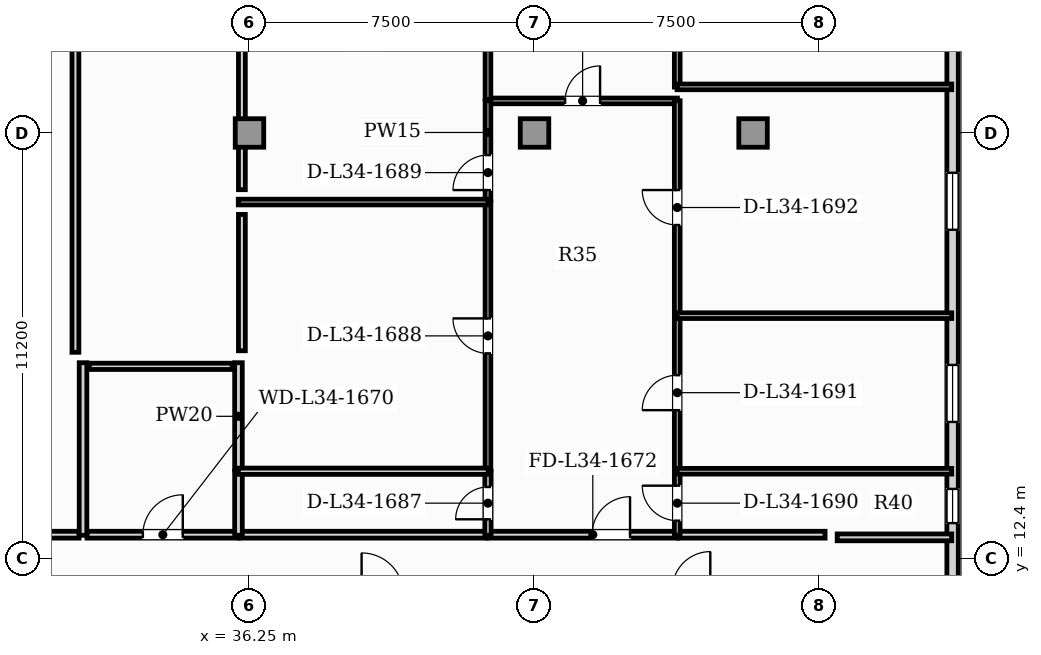
"""IFC4 building model, lengths in metres.
Left out: names, types, materials, properties, quantities, classifications, styles, units other than length and angle.
Written with IfcOpenShell. Run it as: python <this file> out.ifc"""

import sys

from ifc_helpers import new_model, si_unit, direction, frame, frame_2d, origin, origin_2d, place, context, subcontext, project, spatial, rectangle, extrude, element, fill, save


model = new_model("IFC4")
c1 = context("Model", 3, precision=1e-05, world=origin(), true_north=direction((0.0, 1.0)))
c2 = subcontext(c1, "Body", "Model", "MODEL_VIEW")
j1 = project(units=[si_unit("LENGTHUNIT", "METRE"), si_unit("PLANEANGLEUNIT", "RADIAN")], contexts=[c1])
p1 = place(None, origin())
s1 = spatial("IfcSite", under=j1, at=p1, CompositionType="ELEMENT")
p2 = place(p1, origin())
s2 = spatial("IfcBuilding", under=s1, at=p2, CompositionType="ELEMENT")
p3 = place(p2, frame((0.0, 0.0, 140.15)))
s3 = spatial("IfcBuildingStorey", under=s2, at=p3, CompositionType="ELEMENT", Elevation=140.15)
for number, where, z_axis, x_axis in (
    (1, (36.25, 23.6, 0.0), (0.0, 0.0, 1.0), (1.0, 0.0, 0.0)),
    (2, (43.75, 23.6, 0.0), (0.0, 0.0, 1.0), (1.0, 0.0, 0.0)),
    (3, (49.5, 23.6, 0.0), (0.0, 0.0, 1.0), (1.0, 0.0, 0.0)),
):
    element("IfcColumn", number, at=place(p3, frame(where, z_axis=z_axis, x_axis=x_axis)), inside=s3, PredefinedType="COLUMN", context=c2, shape_type="SweptSolid", body=[
        extrude(rectangle(XDim=0.75, YDim=0.75, at=origin_2d()), origin(), (0.0, 0.0, 1.0), 5.05),
    ])
p4 = place(p3, frame((54.75, 3.24, 0.0), z_axis=(0.0, 0.0, 1.0), x_axis=(0.0, 1.0, 0.0)))
e4 = element("IfcWall", 4, at=p4, inside=s3, PredefinedType="SOLIDWALL", context=c2, shape_type="SweptSolid", body=[
    extrude(rectangle(XDim=36.72, YDim=0.3, at=frame_2d((18.36, 0.0))), origin(), (0.0, 0.0, 1.0), 4.83),
])
p5 = place(p4, frame((30.56, 0.0, 0.95)))
e5 = element("IfcOpeningElement", 5, at=p5, cuts=e4, PredefinedType="OPENING", context=c2, shape_type="SweptSolid", body=[
    extrude(rectangle(XDim=0.9, YDim=1.5, at=frame_2d((0.45, 0.75))), frame((0.0, 0.16, 0.0), z_axis=(0.0, -1.0, 0.0), x_axis=(1.0, 0.0, 0.0)), (0.0, 0.0, 1.0), 0.32),
])
p6 = place(p4, frame((10.095, 0.0, 0.95)))
e6 = element("IfcOpeningElement", 6, at=p6, cuts=e4, PredefinedType="OPENING", context=c2, shape_type="SweptSolid", body=[
    extrude(rectangle(XDim=0.9, YDim=1.5, at=frame_2d((0.45, 0.75))), frame((0.0, 0.16, 0.0), z_axis=(0.0, -1.0, 0.0), x_axis=(1.0, 0.0, 0.0)), (0.0, 0.0, 1.0), 0.32),
])
p7 = place(p4, frame((12.757, 0.0, 0.9)))
e7 = element("IfcOpeningElement", 7, at=p7, cuts=e4, PredefinedType="OPENING", context=c2, shape_type="SweptSolid", body=[
    extrude(rectangle(XDim=1.5, YDim=1.95, at=frame_2d((0.75, 0.975))), frame((0.0, 0.16, 0.0), z_axis=(0.0, -1.0, 0.0), x_axis=(1.0, 0.0, 0.0)), (0.0, 0.0, 1.0), 0.32),
])
p8 = place(p4, frame((17.813, 0.0, 0.9)))
e8 = element("IfcOpeningElement", 8, at=p8, cuts=e4, PredefinedType="OPENING", context=c2, shape_type="SweptSolid", body=[
    extrude(rectangle(XDim=1.5, YDim=1.95, at=frame_2d((0.75, 0.975))), frame((0.0, 0.16, 0.0), z_axis=(0.0, -1.0, 0.0), x_axis=(1.0, 0.0, 0.0)), (0.0, 0.0, 1.0), 0.32),
])
p9 = place(p4, frame((25.167, 0.0, 0.9)))
e9 = element("IfcOpeningElement", 9, at=p9, cuts=e4, PredefinedType="OPENING", context=c2, shape_type="SweptSolid", body=[
    extrude(rectangle(XDim=1.5, YDim=1.95, at=frame_2d((0.75, 0.975))), frame((0.0, 0.16, 0.0), z_axis=(0.0, -1.0, 0.0), x_axis=(1.0, 0.0, 0.0)), (0.0, 0.0, 1.0), 0.32),
])
p10 = place(p4, frame((32.834, 0.0, 0.9)))
e10 = element("IfcOpeningElement", 10, at=p10, cuts=e4, PredefinedType="OPENING", context=c2, shape_type="SweptSolid", body=[
    extrude(rectangle(XDim=1.5, YDim=1.95, at=frame_2d((0.75, 0.975))), frame((0.0, 0.16, 0.0), z_axis=(0.0, -1.0, 0.0), x_axis=(1.0, 0.0, 0.0)), (0.0, 0.0, 1.0), 0.32),
])
p11 = place(p3, frame((21.535, 13.03, 0.0), z_axis=(0.0, 0.0, 1.0), x_axis=(1.0, 0.0, 0.0)))
e11 = element("IfcWall", 11, at=p11, inside=s3, PredefinedType="PARTITIONING", context=c2, shape_type="SweptSolid", body=[
    extrude(rectangle(XDim=10.23, YDim=0.18, at=frame_2d((5.115, 0.0))), origin(), (0.0, 0.0, 1.0), 4.83),
])
p12 = place(p11, frame((3.081, 0.0, 0.0)))
e12 = element("IfcOpeningElement", 12, at=p12, cuts=e11, PredefinedType="OPENING", context=c2, shape_type="SweptSolid", body=[
    extrude(rectangle(XDim=1.0, YDim=2.15, at=frame_2d((0.5, 1.075))), frame((0.0, 0.1, 0.0), z_axis=(0.0, -1.0, 0.0), x_axis=(1.0, 0.0, 0.0)), (0.0, 0.0, 1.0), 0.2),
])
p13 = place(p3, frame((31.975, 13.03, 0.0), z_axis=(0.0, 0.0, 1.0), x_axis=(1.0, 0.0, 0.0)))
e13 = element("IfcWall", 13, at=p13, inside=s3, PredefinedType="PARTITIONING", context=c2, shape_type="SweptSolid", body=[
    extrude(rectangle(XDim=3.99, YDim=0.18, at=frame_2d((1.995, 0.0))), origin(), (0.0, 0.0, 1.0), 4.83),
])
p14 = place(p13, frame((1.47, 0.0, 0.0)))
e14 = element("IfcOpeningElement", 14, at=p14, cuts=e13, PredefinedType="OPENING", context=c2, shape_type="SweptSolid", body=[
    extrude(rectangle(XDim=1.05, YDim=2.15, at=frame_2d((0.525, 1.075))), frame((0.0, 0.1, 0.0), z_axis=(0.0, -1.0, 0.0), x_axis=(1.0, 0.0, 0.0)), (0.0, 0.0, 1.0), 0.2),
])
p15 = place(p3, frame((42.52, 13.03, 0.0), z_axis=(0.0, 0.0, 1.0), x_axis=(1.0, 0.0, 0.0)))
e15 = element("IfcWall", 15, at=p15, inside=s3, PredefinedType="PARTITIONING", context=c2, shape_type="SweptSolid", body=[
    extrude(rectangle(XDim=4.99, YDim=0.18, at=frame_2d((2.495, 0.0))), origin(), (0.0, 0.0, 1.0), 4.83),
])
p16 = place(p15, frame((2.743, 0.0, 0.0)))
e16 = element("IfcOpeningElement", 16, at=p16, cuts=e15, PredefinedType="OPENING", context=c2, shape_type="SweptSolid", body=[
    extrude(rectangle(XDim=1.0, YDim=2.15, at=frame_2d((0.5, 1.075))), frame((0.0, 0.1, 0.0), z_axis=(0.0, -1.0, 0.0), x_axis=(1.0, 0.0, 0.0)), (0.0, 0.0, 1.0), 0.2),
])
p17 = place(p3, frame((35.995, 13.03, 0.0), z_axis=(0.0, 0.0, 1.0), x_axis=(1.0, 0.0, 0.0)))
e17 = element("IfcWall", 17, at=p17, inside=s3, PredefinedType="PARTITIONING", context=c2, shape_type="SweptSolid", body=[
    extrude(rectangle(XDim=6.495, YDim=0.18, at=frame_2d((3.248, 0.0))), origin(), (0.0, 0.0, 1.0), 4.83),
])
p18 = place(p3, frame((47.54, 13.03, 0.0), z_axis=(0.0, 0.0, 1.0), x_axis=(1.0, 0.0, 0.0)))
e18 = element("IfcWall", 18, at=p18, inside=s3, PredefinedType="PARTITIONING", context=c2, shape_type="SweptSolid", body=[
    extrude(rectangle(XDim=3.855, YDim=0.18, at=frame_2d((1.927, 0.0))), origin(), (0.0, 0.0, 1.0), 4.83),
])
p19 = place(p3, frame((31.87, 13.015, 0.0), z_axis=(0.0, 0.0, 1.0), x_axis=(0.0, 1.0, 0.0)))
e19 = element("IfcWall", 19, at=p19, inside=s3, PredefinedType="PARTITIONING", context=c2, shape_type="SweptSolid", body=[
    extrude(rectangle(XDim=4.54, YDim=0.2, at=frame_2d((2.27, 0.0))), origin(), (0.0, 0.0, 1.0), 4.83),
])
p20 = place(p3, frame((35.96, 13.015, 0.0), z_axis=(0.0, 0.0, 1.0), x_axis=(0.0, 1.0, 0.0)))
e20 = element("IfcWall", 20, at=p20, inside=s3, PredefinedType="PARTITIONING", context=c2, shape_type="SweptSolid", body=[
    extrude(rectangle(XDim=1.69, YDim=0.2, at=frame_2d((0.845, 0.0))), origin(), (0.0, 0.0, 1.0), 4.83),
])
p21 = place(p3, frame((35.96, 14.735, 0.0), z_axis=(0.0, 0.0, 1.0), x_axis=(0.0, 1.0, 0.0)))
e21 = element("IfcWall", 21, at=p21, inside=s3, PredefinedType="PARTITIONING", context=c2, shape_type="SweptSolid", body=[
    extrude(rectangle(XDim=2.82, YDim=0.2, at=frame_2d((1.41, 0.0))), origin(), (0.0, 0.0, 1.0), 4.83),
])
p22 = place(p3, frame((42.52, 24.444, 0.0), z_axis=(0.0, 0.0, 1.0), x_axis=(1.0, 0.0, 0.0)))
e22 = element("IfcWall", 22, at=p22, inside=s3, PredefinedType="PARTITIONING", context=c2, shape_type="SweptSolid", body=[
    extrude(rectangle(XDim=4.99, YDim=0.15, at=frame_2d((2.495, 0.0))), origin(), (0.0, 0.0, 1.0), 4.83),
])
p23 = place(p22, frame((2.035, 0.0, 0.0)))
e23 = element("IfcOpeningElement", 23, at=p23, cuts=e22, PredefinedType="OPENING", context=c2, shape_type="SweptSolid", body=[
    extrude(rectangle(XDim=0.92, YDim=2.1, at=frame_2d((0.46, 1.05))), frame((0.0, 0.085, 0.0), z_axis=(0.0, -1.0, 0.0), x_axis=(1.0, 0.0, 0.0)), (0.0, 0.0, 1.0), 0.17),
])
p24 = place(p3, frame((42.525, 13.015, 0.0), z_axis=(0.0, 0.0, 1.0), x_axis=(0.0, 1.0, 0.0)))
e24 = element("IfcWall", 24, at=p24, inside=s3, PredefinedType="PLUMBINGWALL", context=c2, shape_type="SweptSolid", body=[
    extrude(rectangle(XDim=1.69, YDim=0.165, at=frame_2d((0.845, 0.0))), origin(), (0.0, 0.0, 1.0), 4.83),
])
p25 = place(p24, frame((0.42, 0.0, 0.0)))
e25 = element("IfcOpeningElement", 25, at=p25, cuts=e24, PredefinedType="OPENING", context=c2, shape_type="SweptSolid", body=[
    extrude(rectangle(XDim=0.85, YDim=2.1, at=frame_2d((0.425, 1.05))), frame((0.0, 0.093, 0.0), z_axis=(0.0, -1.0, 0.0), x_axis=(1.0, 0.0, 0.0)), (0.0, 0.0, 1.0), 0.185),
])
p26 = place(p3, frame((42.525, 14.735, 0.0), z_axis=(0.0, 0.0, 1.0), x_axis=(0.0, 1.0, 0.0)))
e26 = element("IfcWall", 26, at=p26, inside=s3, PredefinedType="PARTITIONING", context=c2, shape_type="SweptSolid", body=[
    extrude(rectangle(XDim=7.052, YDim=0.15, at=frame_2d((3.526, 0.0))), origin(), (0.0, 0.0, 1.0), 4.83),
])
p27 = place(p26, frame((3.066, 0.0, 0.0)))
e27 = element("IfcOpeningElement", 27, at=p27, cuts=e26, PredefinedType="OPENING", context=c2, shape_type="SweptSolid", body=[
    extrude(rectangle(XDim=0.92, YDim=2.1, at=frame_2d((0.46, 1.05))), frame((0.0, 0.085, 0.0), z_axis=(0.0, -1.0, 0.0), x_axis=(1.0, 0.0, 0.0)), (0.0, 0.0, 1.0), 0.17),
])
p28 = place(p3, frame((42.525, 21.818, 0.0), z_axis=(0.0, 0.0, 1.0), x_axis=(0.0, 1.0, 0.0)))
e28 = element("IfcWall", 28, at=p28, inside=s3, PredefinedType="PARTITIONING", context=c2, shape_type="SweptSolid", body=[
    extrude(rectangle(XDim=2.632, YDim=0.15, at=frame_2d((1.316, 0.0))), origin(), (0.0, 0.0, 1.0), 4.83),
])
p29 = place(p28, frame((0.28, 0.0, 0.0)))
e29 = element("IfcOpeningElement", 29, at=p29, cuts=e28, PredefinedType="OPENING", context=c2, shape_type="SweptSolid", body=[
    extrude(rectangle(XDim=0.92, YDim=2.1, at=frame_2d((0.46, 1.05))), frame((0.0, 0.085, 0.0), z_axis=(0.0, -1.0, 0.0), x_axis=(1.0, 0.0, 0.0)), (0.0, 0.0, 1.0), 0.17),
])
p30 = place(p3, frame((47.505, 13.015, 0.0), z_axis=(0.0, 0.0, 1.0), x_axis=(0.0, 1.0, 0.0)))
e30 = element("IfcWall", 30, at=p30, inside=s3, PredefinedType="PARTITIONING", context=c2, shape_type="SweptSolid", body=[
    extrude(rectangle(XDim=1.69, YDim=0.15, at=frame_2d((0.845, 0.0))), origin(), (0.0, 0.0, 1.0), 4.377),
])
p31 = place(p30, frame((0.385, 0.0, 0.0)))
e31 = element("IfcOpeningElement", 31, at=p31, cuts=e30, PredefinedType="OPENING", context=c2, shape_type="SweptSolid", body=[
    extrude(rectangle(XDim=0.92, YDim=2.1, at=frame_2d((0.46, 1.05))), frame((0.0, 0.085, 0.0), z_axis=(0.0, -1.0, 0.0), x_axis=(1.0, 0.0, 0.0)), (0.0, 0.0, 1.0), 0.17),
])
p32 = place(p3, frame((47.505, 14.735, 0.0), z_axis=(0.0, 0.0, 1.0), x_axis=(0.0, 1.0, 0.0)))
e32 = element("IfcWall", 32, at=p32, inside=s3, PredefinedType="PARTITIONING", context=c2, shape_type="SweptSolid", body=[
    extrude(rectangle(XDim=4.063, YDim=0.15, at=frame_2d((2.032, 0.0))), origin(), (0.0, 0.0, 1.0), 4.377),
])
p33 = place(p32, frame((1.572, 0.0, 0.0)))
e33 = element("IfcOpeningElement", 33, at=p33, cuts=e32, PredefinedType="OPENING", context=c2, shape_type="SweptSolid", body=[
    extrude(rectangle(XDim=0.92, YDim=2.1, at=frame_2d((0.46, 1.05))), frame((0.0, 0.085, 0.0), z_axis=(0.0, -1.0, 0.0), x_axis=(1.0, 0.0, 0.0)), (0.0, 0.0, 1.0), 0.17),
])
p34 = place(p3, frame((47.505, 18.829, 0.0), z_axis=(0.0, 0.0, 1.0), x_axis=(0.0, 1.0, 0.0)))
e34 = element("IfcWall", 34, at=p34, inside=s3, PredefinedType="PARTITIONING", context=c2, shape_type="SweptSolid", body=[
    extrude(rectangle(XDim=5.621, YDim=0.15, at=frame_2d((2.81, 0.0))), origin(), (0.0, 0.0, 1.0), 4.377),
])
p35 = place(p34, frame((2.35, 0.0, 0.0)))
e35 = element("IfcOpeningElement", 35, at=p35, cuts=e34, PredefinedType="OPENING", context=c2, shape_type="SweptSolid", body=[
    extrude(rectangle(XDim=0.92, YDim=2.1, at=frame_2d((0.46, 1.05))), frame((0.0, 0.085, 0.0), z_axis=(0.0, -1.0, 0.0), x_axis=(1.0, 0.0, 0.0)), (0.0, 0.0, 1.0), 0.17),
])
p36 = place(p3, frame((42.525, 24.479, 0.0), z_axis=(0.0, 0.0, 1.0), x_axis=(0.0, 1.0, 0.0)))
e36 = element("IfcWall", 36, at=p36, inside=s3, PredefinedType="PARTITIONING", context=c2, shape_type="SweptSolid", body=[
    extrude(rectangle(XDim=9.026, YDim=0.15, at=frame_2d((4.513, 0.0))), origin(), (0.0, 0.0, 1.0), 4.83),
])
p37 = place(p36, frame((5.407, 0.0, 0.0)))
e37 = element("IfcOpeningElement", 37, at=p37, cuts=e36, PredefinedType="OPENING", context=c2, shape_type="SweptSolid", body=[
    extrude(rectangle(XDim=0.92, YDim=2.1, at=frame_2d((0.46, 1.05))), frame((0.0, 0.085, 0.0), z_axis=(0.0, -1.0, 0.0), x_axis=(1.0, 0.0, 0.0)), (0.0, 0.0, 1.0), 0.17),
])
p38 = place(p3, frame((47.505, 24.808, 0.0), z_axis=(0.0, 0.0, 1.0), x_axis=(0.0, 1.0, 0.0)))
e38 = element("IfcWall", 38, at=p38, inside=s3, PredefinedType="PARTITIONING", context=c2, shape_type="SweptSolid", body=[
    extrude(rectangle(XDim=8.697, YDim=0.15, at=frame_2d((4.349, 0.0))), origin(), (0.0, 0.0, 1.0), 4.377),
])
p39 = place(p38, frame((3.889, 0.0, 0.0)))
e39 = element("IfcOpeningElement", 39, at=p39, cuts=e38, PredefinedType="OPENING", context=c2, shape_type="SweptSolid", body=[
    extrude(rectangle(XDim=0.92, YDim=2.1, at=frame_2d((0.46, 1.05))), frame((0.0, 0.085, 0.0), z_axis=(0.0, -1.0, 0.0), x_axis=(1.0, 0.0, 0.0)), (0.0, 0.0, 1.0), 0.17),
])
p40 = place(p3, frame((35.955, 14.7, 0.0), z_axis=(0.0, 0.0, 1.0), x_axis=(1.0, 0.0, 0.0)))
e40 = element("IfcWall", 40, at=p40, inside=s3, PredefinedType="PLUMBINGWALL", context=c2, shape_type="SweptSolid", body=[
    extrude(rectangle(XDim=6.575, YDim=0.165, at=frame_2d((3.288, 0.0))), origin(), (0.0, 0.0, 1.0), 4.83),
])
p41 = place(p3, frame((35.955, 21.783, 0.0), z_axis=(0.0, 0.0, 1.0), x_axis=(1.0, 0.0, 0.0)))
e41 = element("IfcWall", 41, at=p41, inside=s3, PredefinedType="PARTITIONING", context=c2, shape_type="SweptSolid", body=[
    extrude(rectangle(XDim=6.575, YDim=0.15, at=frame_2d((3.288, 0.0))), origin(), (0.0, 0.0, 1.0), 4.83),
])
for number, where, z_axis, x_axis in (
    (42, (47.5, 14.7, 0.0), (0.0, 0.0, 1.0), (1.0, 0.0, 0.0)),
    (43, (47.5, 18.793, 0.0), (0.0, 0.0, 1.0), (1.0, 0.0, 0.0)),
    (44, (47.5, 24.813, 0.0), (0.0, 0.0, 1.0), (1.0, 0.0, 0.0)),
):
    element("IfcWall", number, at=place(p3, frame(where, z_axis=z_axis, x_axis=x_axis)), inside=s3, PredefinedType="PARTITIONING", context=c2, shape_type="SweptSolid", body=[
        extrude(rectangle(XDim=7.228, YDim=0.15, at=frame_2d((3.614, 0.0))), origin(), (0.0, 0.0, 1.0), 4.83),
    ])
p42 = place(p3, frame((31.67, 36.832, 0.0), z_axis=(0.0, 0.0, 1.0), x_axis=(0.0, -1.0, 0.0)))
e45 = element("IfcWall", 45, at=p42, inside=s3, PredefinedType="PARTITIONING", context=c2, shape_type="SweptSolid", body=[
    extrude(rectangle(XDim=19.003, YDim=0.18, at=frame_2d((9.501, 0.0))), origin(), (0.0, 0.0, 1.0), 4.83),
])
p43 = place(p3, frame((32.035, 17.46, 0.0), z_axis=(0.0, 0.0, 1.0), x_axis=(1.0, 0.0, 0.0)))
e46 = element("IfcWall", 46, at=p43, inside=s3, PredefinedType="PLUMBINGWALL", context=c2, shape_type="SweptSolid", body=[
    extrude(rectangle(XDim=3.76, YDim=0.165, at=frame_2d((1.88, 0.0))), origin(), (0.0, 0.0, 1.0), 4.83),
])
p44 = place(p3, frame((36.05, 17.87, 0.0), z_axis=(0.0, 0.0, 1.0), x_axis=(0.0, 1.0, 0.0)))
e47 = element("IfcWall", 47, at=p44, inside=s3, PredefinedType="PARTITIONING", context=c2, shape_type="SweptSolid", body=[
    extrude(rectangle(XDim=3.588, YDim=0.18, at=frame_2d((1.794, 0.0))), origin(), (0.0, 0.0, 1.0), 4.377),
])
p45 = place(p3, frame((36.05, 22.108, 0.0), z_axis=(0.0, 0.0, 1.0), x_axis=(0.0, 1.0, 0.0)))
e48 = element("IfcWall", 48, at=p45, inside=s3, PredefinedType="PARTITIONING", context=c2, shape_type="SweptSolid", body=[
    extrude(rectangle(XDim=11.067, YDim=0.18, at=frame_2d((5.534, 0.0))), origin(), (0.0, 0.0, 1.0), 4.377),
])
p46 = place(p3, frame((54.728, 12.96, 0.0), z_axis=(0.0, 0.0, 1.0), x_axis=(-1.0, 0.0, 0.0)))
e49 = element("IfcWall", 49, at=p46, inside=s3, PredefinedType="PARTITIONING", context=c2, shape_type="SweptSolid", body=[
    extrude(rectangle(XDim=3.014, YDim=0.18, at=frame_2d((1.507, 0.0))), origin(), (0.0, 0.0, 1.0), 4.83),
])
p47 = place(p6, origin())
e50 = element("IfcWindow", 50, at=p47, inside=s3, PartitioningType="SINGLE_PANEL", PredefinedType="WINDOW", context=c2, shape_type="SweptSolid", body=[
    extrude(rectangle(XDim=0.9, YDim=1.5, at=frame_2d((0.45, 0.75))), frame((0.0, 0.03, 0.0), z_axis=(0.0, -1.0, 0.0), x_axis=(1.0, 0.0, 0.0)), (0.0, 0.0, 1.0), 0.06),
])
fill(e6, e50)
p48 = place(p7, origin())
e51 = element("IfcWindow", 51, at=p48, inside=s3, PartitioningType="SINGLE_PANEL", PredefinedType="WINDOW", context=c2, shape_type="SweptSolid", body=[
    extrude(rectangle(XDim=1.5, YDim=1.95, at=frame_2d((0.75, 0.975))), frame((0.0, 0.03, 0.0), z_axis=(0.0, -1.0, 0.0), x_axis=(1.0, 0.0, 0.0)), (0.0, 0.0, 1.0), 0.06),
])
fill(e7, e51)
p49 = place(p8, origin())
e52 = element("IfcWindow", 52, at=p49, inside=s3, PartitioningType="SINGLE_PANEL", PredefinedType="WINDOW", context=c2, shape_type="SweptSolid", body=[
    extrude(rectangle(XDim=1.5, YDim=1.95, at=frame_2d((0.75, 0.975))), frame((0.0, 0.03, 0.0), z_axis=(0.0, -1.0, 0.0), x_axis=(1.0, 0.0, 0.0)), (0.0, 0.0, 1.0), 0.06),
])
fill(e8, e52)
p50 = place(p14, origin())
e53 = element("IfcDoor", 53, at=p50, inside=s3, OperationType="SINGLE_SWING_RIGHT", PredefinedType="DOOR", context=c2, shape_type="SweptSolid", body=[
    extrude(rectangle(XDim=1.05, YDim=2.15, at=frame_2d((0.525, 1.075))), frame((0.0, 0.025, 0.0), z_axis=(0.0, -1.0, 0.0), x_axis=(1.0, 0.0, 0.0)), (0.0, 0.0, 1.0), 0.05),
])
fill(e14, e53)
p51 = place(p16, origin())
e54 = element("IfcDoor", 54, at=p51, inside=s3, OperationType="SINGLE_SWING_RIGHT", PredefinedType="DOOR", context=c2, shape_type="SweptSolid", body=[
    extrude(rectangle(XDim=1.0, YDim=2.15, at=frame_2d((0.5, 1.075))), frame((0.0, 0.025, 0.0), z_axis=(0.0, -1.0, 0.0), x_axis=(1.0, 0.0, 0.0)), (0.0, 0.0, 1.0), 0.05),
])
fill(e16, e54)
p52 = place(p23, origin())
e55 = element("IfcDoor", 55, at=p52, inside=s3, OperationType="SINGLE_SWING_RIGHT", PredefinedType="DOOR", context=c2, shape_type="SweptSolid", body=[
    extrude(rectangle(XDim=0.92, YDim=2.1, at=frame_2d((0.46, 1.05))), frame((0.0, 0.025, 0.0), z_axis=(0.0, -1.0, 0.0), x_axis=(1.0, 0.0, 0.0)), (0.0, 0.0, 1.0), 0.05),
])
fill(e23, e55)
p53 = place(p25, origin())
e56 = element("IfcDoor", 56, at=p53, inside=s3, OperationType="SINGLE_SWING_LEFT", PredefinedType="DOOR", context=c2, shape_type="SweptSolid", body=[
    extrude(rectangle(XDim=0.85, YDim=2.1, at=frame_2d((0.425, 1.05))), frame((0.0, 0.025, 0.0), z_axis=(0.0, -1.0, 0.0), x_axis=(1.0, 0.0, 0.0)), (0.0, 0.0, 1.0), 0.05),
])
fill(e25, e56)
p54 = place(p27, origin())
e57 = element("IfcDoor", 57, at=p54, inside=s3, OperationType="SINGLE_SWING_RIGHT", PredefinedType="DOOR", context=c2, shape_type="SweptSolid", body=[
    extrude(rectangle(XDim=0.92, YDim=2.1, at=frame_2d((0.46, 1.05))), frame((0.0, 0.025, 0.0), z_axis=(0.0, -1.0, 0.0), x_axis=(1.0, 0.0, 0.0)), (0.0, 0.0, 1.0), 0.05),
])
fill(e27, e57)
p55 = place(p29, origin())
e58 = element("IfcDoor", 58, at=p55, inside=s3, OperationType="SINGLE_SWING_LEFT", PredefinedType="DOOR", context=c2, shape_type="SweptSolid", body=[
    extrude(rectangle(XDim=0.92, YDim=2.1, at=frame_2d((0.46, 1.05))), frame((0.0, 0.025, 0.0), z_axis=(0.0, -1.0, 0.0), x_axis=(1.0, 0.0, 0.0)), (0.0, 0.0, 1.0), 0.05),
])
fill(e29, e58)
p56 = place(p31, origin())
e59 = element("IfcDoor", 59, at=p56, inside=s3, OperationType="SINGLE_SWING_RIGHT", PredefinedType="DOOR", context=c2, shape_type="SweptSolid", body=[
    extrude(rectangle(XDim=0.92, YDim=2.1, at=frame_2d((0.46, 1.05))), frame((0.0, 0.025, 0.0), z_axis=(0.0, -1.0, 0.0), x_axis=(1.0, 0.0, 0.0)), (0.0, 0.0, 1.0), 0.05),
])
fill(e31, e59)
p57 = place(p33, origin())
e60 = element("IfcDoor", 60, at=p57, inside=s3, OperationType="SINGLE_SWING_LEFT", PredefinedType="DOOR", context=c2, shape_type="SweptSolid", body=[
    extrude(rectangle(XDim=0.92, YDim=2.1, at=frame_2d((0.46, 1.05))), frame((0.0, 0.025, 0.0), z_axis=(0.0, -1.0, 0.0), x_axis=(1.0, 0.0, 0.0)), (0.0, 0.0, 1.0), 0.05),
])
fill(e33, e60)
p58 = place(p35, origin())
e61 = element("IfcDoor", 61, at=p58, inside=s3, OperationType="SINGLE_SWING_RIGHT", PredefinedType="DOOR", context=c2, shape_type="SweptSolid", body=[
    extrude(rectangle(XDim=0.92, YDim=2.1, at=frame_2d((0.46, 1.05))), frame((0.0, 0.025, 0.0), z_axis=(0.0, -1.0, 0.0), x_axis=(1.0, 0.0, 0.0)), (0.0, 0.0, 1.0), 0.05),
])
fill(e35, e61)
save(model, sys.argv[1])
